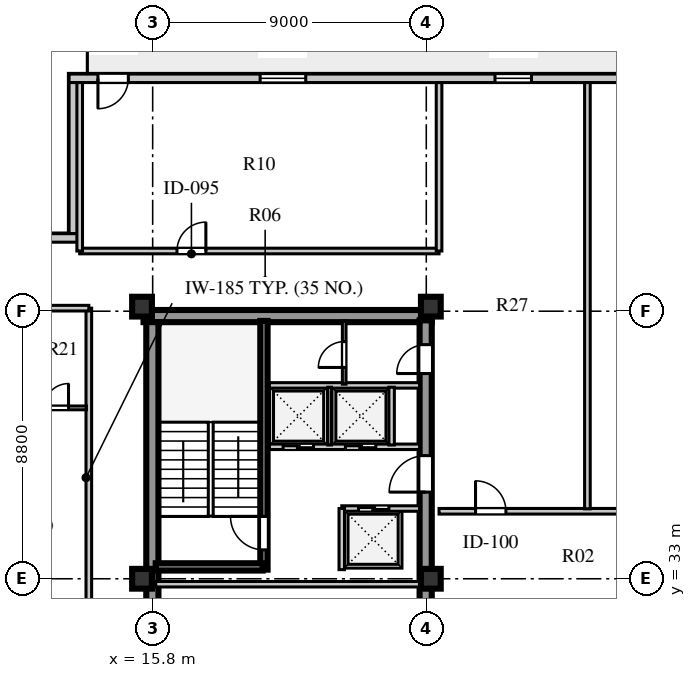
"""IFC4 building model, lengths in metres.
Left out: names, types, materials, properties, quantities, classifications, styles, units other than length and angle.
Written with IfcOpenShell. Run it as: python <this file> out.ifc"""

import sys

from ifc_helpers import new_model, si_unit, direction, frame, frame_2d, origin, origin_2d, place, context, subcontext, project, spatial, rectangle, extrude, element, fill, save


model = new_model("IFC4")
c1 = context("Model", 3, precision=1e-05, world=origin(), true_north=direction((0.0, 1.0)))
c2 = subcontext(c1, "Body", "Model", "MODEL_VIEW")
j1 = project(units=[si_unit("LENGTHUNIT", "METRE"), si_unit("PLANEANGLEUNIT", "RADIAN")], contexts=[c1])
p1 = place(None, origin())
s1 = spatial("IfcSite", under=j1, at=p1, CompositionType="ELEMENT")
p2 = place(p1, origin())
s2 = spatial("IfcBuilding", under=s1, at=p2, CompositionType="ELEMENT")
p3 = place(p2, frame((0.0, 0.0, 260.9)))
s3 = spatial("IfcBuildingStorey", under=s2, at=p3, CompositionType="ELEMENT", Elevation=260.9)
p4 = place(p3, frame((15.5, 41.64, 0.0), z_axis=(0.0, 0.0, 1.0), x_axis=(1.0, 0.0, 0.0)))
e1 = element("IfcWall", 1, at=p4, inside=s3, PredefinedType="SHEAR", context=c2, shape_type="SweptSolid", body=[
    extrude(rectangle(XDim=9.48, YDim=0.4, at=frame_2d((4.74, 0.0))), origin(), (0.0, 0.0, 1.0), 3.66),
])
p5 = place(p3, frame((15.79, 15.81, 0.0), z_axis=(0.0, 0.0, 1.0), x_axis=(0.0, 1.0, 0.0)))
e2 = element("IfcWall", 2, at=p5, inside=s3, PredefinedType="SHEAR", context=c2, shape_type="SweptSolid", body=[
    extrude(rectangle(XDim=25.63, YDim=0.4, at=frame_2d((12.815, 0.0))), origin(), (0.0, 0.0, 1.0), 3.66),
])
p6 = place(p3, frame((24.78, 15.74, 0.0), z_axis=(0.0, 0.0, 1.0), x_axis=(0.0, 1.0, 0.0)))
e3 = element("IfcWall", 3, at=p6, inside=s3, PredefinedType="SHEAR", context=c2, shape_type="SweptSolid", body=[
    extrude(rectangle(XDim=25.76, YDim=0.4, at=frame_2d((12.88, 0.0))), origin(), (0.0, 0.0, 1.0), 3.66),
])
p7 = place(p6, frame((1.61, 0.0, 0.0)))
e4 = element("IfcOpeningElement", 4, at=p7, cuts=e3, PredefinedType="OPENING", context=c2, shape_type="SweptSolid", body=[
    extrude(rectangle(XDim=1.2, YDim=2.1, at=frame_2d((0.6, 1.05))), frame((0.0, 0.21, 0.0), z_axis=(0.0, -1.0, 0.0), x_axis=(1.0, 0.0, 0.0)), (0.0, 0.0, 1.0), 0.42),
])
p8 = place(p6, frame((6.78, 0.0, 0.0)))
e5 = element("IfcOpeningElement", 5, at=p8, cuts=e3, PredefinedType="OPENING", context=c2, shape_type="SweptSolid", body=[
    extrude(rectangle(XDim=0.85, YDim=2.06, at=frame_2d((0.425, 1.03))), frame((0.0, 0.21, 0.0), z_axis=(0.0, -1.0, 0.0), x_axis=(1.0, 0.0, 0.0)), (0.0, 0.0, 1.0), 0.42),
])
p9 = place(p6, frame((12.11, 0.0, 0.0)))
e6 = element("IfcOpeningElement", 6, at=p9, cuts=e3, PredefinedType="OPENING", context=c2, shape_type="SweptSolid", body=[
    extrude(rectangle(XDim=1.5, YDim=2.12, at=frame_2d((0.75, 1.06))), frame((0.0, 0.21, 0.0), z_axis=(0.0, -1.0, 0.0), x_axis=(1.0, 0.0, 0.0)), (0.0, 0.0, 1.0), 0.42),
])
p10 = place(p6, frame((20.11, 0.0, 0.0)))
e7 = element("IfcOpeningElement", 7, at=p10, cuts=e3, PredefinedType="OPENING", context=c2, shape_type="SweptSolid", body=[
    extrude(rectangle(XDim=1.2, YDim=2.12, at=frame_2d((0.6, 1.06))), frame((0.0, 0.21, 0.0), z_axis=(0.0, -1.0, 0.0), x_axis=(1.0, 0.0, 0.0)), (0.0, 0.0, 1.0), 0.42),
])
p11 = place(p6, frame((24.01, 0.0, 0.0)))
e8 = element("IfcOpeningElement", 8, at=p11, cuts=e3, PredefinedType="OPENING", context=c2, shape_type="SweptSolid", body=[
    extrude(rectangle(XDim=0.95, YDim=2.1, at=frame_2d((0.475, 1.05))), frame((0.0, 0.21, 0.0), z_axis=(0.0, -1.0, 0.0), x_axis=(1.0, 0.0, 0.0)), (0.0, 0.0, 1.0), 0.42),
])
for number, where, z_axis, x_axis in (
    (9, (15.45, 33.0, 0.0), (0.0, 0.0, 1.0), (1.0, 0.0, 0.0)),
    (10, (15.45, 41.95, 0.0), (0.0, 0.0, 1.0), (1.0, 0.0, 0.0)),
    (11, (24.95, 33.0, 0.0), (0.0, 0.0, 1.0), (1.0, 0.0, 0.0)),
    (12, (24.95, 41.95, 0.0), (0.0, 0.0, 1.0), (1.0, 0.0, 0.0)),
):
    element("IfcColumn", number, at=place(p3, frame(where, z_axis=z_axis, x_axis=x_axis)), inside=s3, PredefinedType="COLUMN", context=c2, shape_type="SweptSolid", body=[
        extrude(rectangle(XDim=0.65, YDim=0.65, at=origin_2d()), origin(), (0.0, 0.0, 1.0), 3.66),
    ])
p12 = place(p3, frame((45.55, 49.46, 0.0), z_axis=(0.0, 0.0, 1.0), x_axis=(-1.0, 0.0, 0.0)))
e13 = element("IfcWall", 13, at=p12, inside=s3, PredefinedType="STANDARD", context=c2, shape_type="SweptSolid", body=[
    extrude(rectangle(XDim=32.5, YDim=0.28, at=frame_2d((16.25, 0.0))), origin(), (0.0, 0.0, 1.0), 3.66),
])
p13 = place(p12, frame((30.55, 0.0, 0.0)))
e14 = element("IfcOpeningElement", 14, at=p13, cuts=e13, PredefinedType="OPENING", context=c2, shape_type="SweptSolid", body=[
    extrude(rectangle(XDim=1.0, YDim=2.05, at=frame_2d((0.5, 1.025))), frame((0.0, 0.15, 0.0), z_axis=(0.0, -1.0, 0.0), x_axis=(1.0, 0.0, 0.0)), (0.0, 0.0, 1.0), 0.3),
])
p14 = place(p12, frame((24.715, 0.0, 0.8)))
e15 = element("IfcOpeningElement", 15, at=p14, cuts=e13, PredefinedType="OPENING", context=c2, shape_type="SweptSolid", body=[
    extrude(rectangle(XDim=1.5, YDim=2.0, at=frame_2d((0.75, 1.0))), frame((0.0, 0.15, 0.0), z_axis=(0.0, -1.0, 0.0), x_axis=(1.0, 0.0, 0.0)), (0.0, 0.0, 1.0), 0.3),
])
p15 = place(p12, frame((17.29, 0.0, 0.8)))
e16 = element("IfcOpeningElement", 16, at=p15, cuts=e13, PredefinedType="OPENING", context=c2, shape_type="SweptSolid", body=[
    extrude(rectangle(XDim=1.2, YDim=1.75, at=frame_2d((0.6, 0.875))), frame((0.0, 0.15, 0.0), z_axis=(0.0, -1.0, 0.0), x_axis=(1.0, 0.0, 0.0)), (0.0, 0.0, 1.0), 0.3),
])
p16 = place(p12, frame((11.94, 0.0, 0.8)))
e17 = element("IfcOpeningElement", 17, at=p16, cuts=e13, PredefinedType="OPENING", context=c2, shape_type="SweptSolid", body=[
    extrude(rectangle(XDim=2.4, YDim=2.05, at=frame_2d((1.2, 1.025))), frame((0.0, 0.15, 0.0), z_axis=(0.0, -1.0, 0.0), x_axis=(1.0, 0.0, 0.0)), (0.0, 0.0, 1.0), 0.3),
])
p17 = place(p12, frame((4.42, 0.0, 0.8)))
e18 = element("IfcOpeningElement", 18, at=p17, cuts=e13, PredefinedType="OPENING", context=c2, shape_type="SweptSolid", body=[
    extrude(rectangle(XDim=2.1, YDim=1.95, at=frame_2d((1.05, 0.975))), frame((0.0, 0.15, 0.0), z_axis=(0.0, -1.0, 0.0), x_axis=(1.0, 0.0, 0.0)), (0.0, 0.0, 1.0), 0.3),
])
p18 = place(p3, frame((13.19, 49.32, 0.0), z_axis=(0.0, 0.0, 1.0), x_axis=(0.0, -1.0, 0.0)))
e19 = element("IfcWall", 19, at=p18, inside=s3, PredefinedType="STANDARD", context=c2, shape_type="SweptSolid", body=[
    extrude(rectangle(XDim=4.97, YDim=0.28, at=frame_2d((2.485, 0.0))), origin(), (0.0, 0.0, 1.0), 3.66),
])
p19 = place(p3, frame((13.33, 44.21, 0.0), z_axis=(0.0, 0.0, 1.0), x_axis=(-1.0, 0.0, 0.0)))
e20 = element("IfcWall", 20, at=p19, inside=s3, PredefinedType="STANDARD", context=c2, shape_type="SweptSolid", body=[
    extrude(rectangle(XDim=5.53, YDim=0.28, at=frame_2d((2.765, 0.0))), origin(), (0.0, 0.0, 1.0), 3.66),
])
p20 = place(p3, frame((15.9, 32.82, 0.0), z_axis=(0.0, 0.0, 1.0), x_axis=(1.0, 0.0, 0.0)))
e21 = element("IfcWall", 21, at=p20, inside=s3, PredefinedType="SOLIDWALL", context=c2, shape_type="SweptSolid", body=[
    extrude(rectangle(XDim=8.68, YDim=0.18, at=frame_2d((4.34, 0.0))), origin(), (0.0, 0.0, 1.0), 3.06),
])
p21 = place(p3, frame((19.46, 33.3, 0.0), z_axis=(0.0, 0.0, 1.0), x_axis=(0.0, 1.0, 0.0)))
e22 = element("IfcWall", 22, at=p21, inside=s3, PredefinedType="SHEAR", context=c2, shape_type="SweptSolid", body=[
    extrude(rectangle(XDim=8.18, YDim=0.24, at=frame_2d((4.09, 0.0))), origin(), (0.0, 0.0, 1.0), 3.9),
])
p22 = place(p21, frame((0.65, 0.0, 0.0)))
e23 = element("IfcOpeningElement", 23, at=p22, cuts=e22, PredefinedType="OPENING", context=c2, shape_type="SweptSolid", body=[
    extrude(rectangle(XDim=1.1, YDim=2.1, at=frame_2d((0.55, 1.05))), frame((0.0, 0.13, 0.0), z_axis=(0.0, -1.0, 0.0), x_axis=(1.0, 0.0, 0.0)), (0.0, 0.0, 1.0), 0.26),
])
p23 = place(p3, frame((15.9, 33.39, 0.0), z_axis=(0.0, 0.0, 1.0), x_axis=(1.0, 0.0, 0.0)))
e24 = element("IfcWall", 24, at=p23, inside=s3, PredefinedType="SHEAR", context=c2, shape_type="SweptSolid", body=[
    extrude(rectangle(XDim=3.52, YDim=0.24, at=frame_2d((1.76, 0.0))), origin(), (0.0, 0.0, 1.0), 3.9),
])
p24 = place(p3, frame((22.02, 35.31, 0.0), z_axis=(0.0, 0.0, 1.0), x_axis=(1.0, 0.0, 0.0)))
e25 = element("IfcWall", 25, at=p24, inside=s3, PredefinedType="SOLIDWALL", context=c2, shape_type="SweptSolid", body=[
    extrude(rectangle(XDim=2.56, YDim=0.18, at=frame_2d((1.28, 0.0))), origin(), (0.0, 0.0, 1.0), 3.66),
])
p25 = place(p24, frame((0.55, 0.0, 0.0)))
e26 = element("IfcOpeningElement", 26, at=p25, cuts=e25, PredefinedType="OPENING", context=c2, shape_type="SweptSolid", body=[
    extrude(rectangle(XDim=1.0, YDim=2.1, at=frame_2d((0.5, 1.05))), frame((0.0, 0.1, 0.0), z_axis=(0.0, -1.0, 0.0), x_axis=(1.0, 0.0, 0.0)), (0.0, 0.0, 1.0), 0.2),
])
p26 = place(p3, frame((22.02, 33.3, 0.0), z_axis=(0.0, 0.0, 1.0), x_axis=(0.0, 1.0, 0.0)))
e27 = element("IfcWall", 27, at=p26, inside=s3, PredefinedType="SOLIDWALL", context=c2, shape_type="SweptSolid", body=[
    extrude(rectangle(XDim=2.01, YDim=0.18, at=frame_2d((1.005, 0.0))), origin(), (0.0, 0.0, 1.0), 3.66),
])
p27 = place(p3, frame((19.64, 37.34, 0.0), z_axis=(0.0, 0.0, 1.0), x_axis=(1.0, 0.0, 0.0)))
e28 = element("IfcWall", 28, at=p27, inside=s3, PredefinedType="SOLIDWALL", context=c2, shape_type="SweptSolid", body=[
    extrude(rectangle(XDim=4.94, YDim=0.18, at=frame_2d((2.47, 0.0))), origin(), (0.0, 0.0, 1.0), 3.66),
])
p28 = place(p27, frame((0.45, 0.0, 0.0)))
e29 = element("IfcOpeningElement", 29, at=p28, cuts=e28, PredefinedType="OPENING", context=c2, shape_type="SweptSolid", body=[
    extrude(rectangle(XDim=1.0, YDim=2.1, at=frame_2d((0.5, 1.05))), frame((0.0, 0.1, 0.0), z_axis=(0.0, -1.0, 0.0), x_axis=(1.0, 0.0, 0.0)), (0.0, 0.0, 1.0), 0.2),
])
p29 = place(p27, frame((2.5, 0.0, 0.0)))
e30 = element("IfcOpeningElement", 30, at=p29, cuts=e28, PredefinedType="OPENING", context=c2, shape_type="SweptSolid", body=[
    extrude(rectangle(XDim=1.0, YDim=2.1, at=frame_2d((0.5, 1.05))), frame((0.0, 0.1, 0.0), z_axis=(0.0, -1.0, 0.0), x_axis=(1.0, 0.0, 0.0)), (0.0, 0.0, 1.0), 0.2),
])
p30 = place(p3, frame((19.64, 39.36, 0.0), z_axis=(0.0, 0.0, 1.0), x_axis=(1.0, 0.0, 0.0)))
e31 = element("IfcWall", 31, at=p30, inside=s3, PredefinedType="SOLIDWALL", context=c2, shape_type="SweptSolid", body=[
    extrude(rectangle(XDim=4.94, YDim=0.18, at=frame_2d((2.47, 0.0))), origin(), (0.0, 0.0, 1.0), 3.66),
])
p31 = place(p3, frame((21.62, 37.4, 0.0), z_axis=(0.0, 0.0, 1.0), x_axis=(0.0, 1.0, 0.0)))
e32 = element("IfcWall", 32, at=p31, inside=s3, PredefinedType="PARTITIONING", context=c2, shape_type="SweptSolid", body=[
    extrude(rectangle(XDim=1.9, YDim=0.12, at=frame_2d((0.95, 0.0))), origin(), (0.0, 0.0, 1.0), 3.66),
])
p32 = place(p3, frame((23.66, 37.4, 0.0), z_axis=(0.0, 0.0, 1.0), x_axis=(0.0, 1.0, 0.0)))
e33 = element("IfcWall", 33, at=p32, inside=s3, PredefinedType="SOLIDWALL", context=c2, shape_type="SweptSolid", body=[
    extrude(rectangle(XDim=1.9, YDim=0.18, at=frame_2d((0.95, 0.0))), origin(), (0.0, 0.0, 1.0), 3.66),
])
p33 = place(p3, frame((22.1, 39.4, 0.0), z_axis=(0.0, 0.0, 1.0), x_axis=(0.0, 1.0, 0.0)))
e34 = element("IfcWall", 34, at=p33, inside=s3, PredefinedType="PARTITIONING", context=c2, shape_type="SweptSolid", body=[
    extrude(rectangle(XDim=2.08, YDim=0.12, at=frame_2d((1.04, 0.0))), origin(), (0.0, 0.0, 1.0), 3.66),
])
p34 = place(p33, frame((0.55, 0.0, 0.0)))
e35 = element("IfcOpeningElement", 35, at=p34, cuts=e34, PredefinedType="OPENING", context=c2, shape_type="SweptSolid", body=[
    extrude(rectangle(XDim=0.85, YDim=2.06, at=frame_2d((0.425, 1.03))), frame((0.0, 0.07, 0.0), z_axis=(0.0, -1.0, 0.0), x_axis=(1.0, 0.0, 0.0)), (0.0, 0.0, 1.0), 0.14),
])
p35 = place(p3, frame((25.22, 35.22, 0.0), z_axis=(0.0, 0.0, 1.0), x_axis=(1.0, 0.0, 0.0)))
e36 = element("IfcWall", 36, at=p35, inside=s3, PredefinedType="SOLIDWALL", context=c2, shape_type="SweptSolid", body=[
    extrude(rectangle(XDim=9.5, YDim=0.185, at=frame_2d((4.75, 0.0))), origin(), (0.0, 0.0, 1.0), 3.66),
])
p36 = place(p35, frame((1.2, 0.0, 0.0)))
e37 = element("IfcOpeningElement", 37, at=p36, cuts=e36, PredefinedType="OPENING", context=c2, shape_type="SweptSolid", body=[
    extrude(rectangle(XDim=1.0, YDim=2.08, at=frame_2d((0.5, 1.04))), frame((0.0, 0.103, 0.0), z_axis=(0.0, -1.0, 0.0), x_axis=(1.0, 0.0, 0.0)), (0.0, 0.0, 1.0), 0.205),
])
p37 = place(p35, frame((6.2, 0.0, 0.0)))
e38 = element("IfcOpeningElement", 38, at=p37, cuts=e36, PredefinedType="OPENING", context=c2, shape_type="SweptSolid", body=[
    extrude(rectangle(XDim=0.9, YDim=2.08, at=frame_2d((0.45, 1.04))), frame((0.0, 0.103, 0.0), z_axis=(0.0, -1.0, 0.0), x_axis=(1.0, 0.0, 0.0)), (0.0, 0.0, 1.0), 0.205),
])
p38 = place(p3, frame((13.4, 43.78, 0.0), z_axis=(0.0, 0.0, 1.0), x_axis=(1.0, 0.0, 0.0)))
e39 = element("IfcWall", 39, at=p38, inside=s3, PredefinedType="SOLIDWALL", context=c2, shape_type="SweptSolid", body=[
    extrude(rectangle(XDim=11.82, YDim=0.185, at=frame_2d((5.91, 0.0))), origin(), (0.0, 0.0, 1.0), 3.66),
])
p39 = place(p38, frame((3.2, 0.0, 0.0)))
e40 = element("IfcOpeningElement", 40, at=p39, cuts=e39, PredefinedType="OPENING", context=c2, shape_type="SweptSolid", body=[
    extrude(rectangle(XDim=0.95, YDim=2.08, at=frame_2d((0.475, 1.04))), frame((0.0, 0.103, 0.0), z_axis=(0.0, -1.0, 0.0), x_axis=(1.0, 0.0, 0.0)), (0.0, 0.0, 1.0), 0.205),
])
p40 = place(p3, frame((13.4, 43.78, 0.0), z_axis=(0.0, 0.0, 1.0), x_axis=(0.0, 1.0, 0.0)))
e41 = element("IfcWall", 41, at=p40, inside=s3, PredefinedType="SOLIDWALL", context=c2, shape_type="SweptSolid", body=[
    extrude(rectangle(XDim=5.54, YDim=0.185, at=frame_2d((2.77, 0.0))), origin(), (0.0, 0.0, 1.0), 3.66),
])
p41 = place(p3, frame((25.22, 43.78, 0.0), z_axis=(0.0, 0.0, 1.0), x_axis=(0.0, 1.0, 0.0)))
e42 = element("IfcWall", 42, at=p41, inside=s3, PredefinedType="SOLIDWALL", context=c2, shape_type="SweptSolid", body=[
    extrude(rectangle(XDim=5.54, YDim=0.185, at=frame_2d((2.77, 0.0))), origin(), (0.0, 0.0, 1.0), 3.21),
])
p42 = place(p3, frame((13.7, 15.3, 0.0), z_axis=(0.0, 0.0, 1.0), x_axis=(0.0, 1.0, 0.0)))
e43 = element("IfcWall", 43, at=p42, inside=s3, PredefinedType="SOLIDWALL", context=c2, shape_type="SweptSolid", body=[
    extrude(rectangle(XDim=26.6, YDim=0.185, at=frame_2d((13.3, 0.0))), origin(), (0.0, 0.0, 1.0), 3.66),
])
p43 = place(p42, frame((0.65, 0.0, 0.0)))
e44 = element("IfcOpeningElement", 44, at=p43, cuts=e43, PredefinedType="OPENING", context=c2, shape_type="SweptSolid", body=[
    extrude(rectangle(XDim=0.95, YDim=2.1, at=frame_2d((0.475, 1.05))), frame((0.0, 0.103, 0.0), z_axis=(0.0, -1.0, 0.0), x_axis=(1.0, 0.0, 0.0)), (0.0, 0.0, 1.0), 0.205),
])
p44 = place(p42, frame((7.1, 0.0, 0.0)))
e45 = element("IfcOpeningElement", 45, at=p44, cuts=e43, PredefinedType="OPENING", context=c2, shape_type="SweptSolid", body=[
    extrude(rectangle(XDim=0.95, YDim=2.1, at=frame_2d((0.475, 1.05))), frame((0.0, 0.103, 0.0), z_axis=(0.0, -1.0, 0.0), x_axis=(1.0, 0.0, 0.0)), (0.0, 0.0, 1.0), 0.205),
])
p45 = place(p42, frame((14.35, 0.0, 0.0)))
e46 = element("IfcOpeningElement", 46, at=p45, cuts=e43, PredefinedType="OPENING", context=c2, shape_type="SweptSolid", body=[
    extrude(rectangle(XDim=0.95, YDim=2.1, at=frame_2d((0.475, 1.05))), frame((0.0, 0.103, 0.0), z_axis=(0.0, -1.0, 0.0), x_axis=(1.0, 0.0, 0.0)), (0.0, 0.0, 1.0), 0.205),
])
p46 = place(p3, frame((8.08, 41.9, 0.0), z_axis=(0.0, 0.0, 1.0), x_axis=(1.0, 0.0, 0.0)))
e47 = element("IfcWall", 47, at=p46, inside=s3, PredefinedType="SOLIDWALL", context=c2, shape_type="SweptSolid", body=[
    extrude(rectangle(XDim=5.62, YDim=0.185, at=frame_2d((2.81, 0.0))), origin(), (0.0, 0.0, 1.0), 3.21),
])
p47 = place(p3, frame((10.45, 38.62, 0.0), z_axis=(0.0, 0.0, 1.0), x_axis=(1.0, 0.0, 0.0)))
e48 = element("IfcWall", 48, at=p47, inside=s3, PredefinedType="PLUMBINGWALL", context=c2, shape_type="SweptSolid", body=[
    extrude(rectangle(XDim=3.17, YDim=0.125, at=frame_2d((1.585, 0.0))), origin(), (0.0, 0.0, 1.0), 3.66),
])
p48 = place(p47, frame((0.16, 0.0, 0.0)))
e49 = element("IfcOpeningElement", 49, at=p48, cuts=e48, PredefinedType="OPENING", context=c2, shape_type="SweptSolid", body=[
    extrude(rectangle(XDim=0.8, YDim=2.05, at=frame_2d((0.4, 1.025))), frame((0.0, 0.073, 0.0), z_axis=(0.0, -1.0, 0.0), x_axis=(1.0, 0.0, 0.0)), (0.0, 0.0, 1.0), 0.145),
])
p49 = place(p47, frame((1.782, 0.0, 0.0)))
e50 = element("IfcOpeningElement", 50, at=p49, cuts=e48, PredefinedType="OPENING", context=c2, shape_type="SweptSolid", body=[
    extrude(rectangle(XDim=0.8, YDim=2.05, at=frame_2d((0.4, 1.025))), frame((0.0, 0.073, 0.0), z_axis=(0.0, -1.0, 0.0), x_axis=(1.0, 0.0, 0.0)), (0.0, 0.0, 1.0), 0.145),
])
p50 = place(p3, frame((30.1, 35.3, 0.0), z_axis=(0.0, 0.0, 1.0), x_axis=(0.0, 1.0, 0.0)))
e51 = element("IfcWall", 51, at=p50, inside=s3, PredefinedType="SOLIDWALL", context=c2, shape_type="SweptSolid", body=[
    extrude(rectangle(XDim=14.02, YDim=0.185, at=frame_2d((7.01, 0.0))), origin(), (0.0, 0.0, 1.0), 3.66),
])
p51 = place(p13, frame((1.0, 0.0, 0.0), z_axis=(0.0, 0.0, 1.0), x_axis=(-1.0, 0.0, 0.0)))
e52 = element("IfcDoor", 52, at=p51, inside=s3, OperationType="SINGLE_SWING_LEFT", PredefinedType="DOOR", context=c2, shape_type="SweptSolid", body=[
    extrude(rectangle(XDim=1.0, YDim=2.05, at=frame_2d((0.5, 1.025))), frame((0.0, 0.025, 0.0), z_axis=(0.0, -1.0, 0.0), x_axis=(1.0, 0.0, 0.0)), (0.0, 0.0, 1.0), 0.05),
])
fill(e14, e52)
p52 = place(p14, origin())
e53 = element("IfcWindow", 53, at=p52, inside=s3, PartitioningType="SINGLE_PANEL", PredefinedType="WINDOW", context=c2, shape_type="SweptSolid", body=[
    extrude(rectangle(XDim=1.5, YDim=2.0, at=frame_2d((0.75, 1.0))), frame((0.0, 0.03, 0.0), z_axis=(0.0, -1.0, 0.0), x_axis=(1.0, 0.0, 0.0)), (0.0, 0.0, 1.0), 0.06),
])
fill(e15, e53)
p53 = place(p15, origin())
e54 = element("IfcWindow", 54, at=p53, inside=s3, PartitioningType="SINGLE_PANEL", PredefinedType="WINDOW", context=c2, shape_type="SweptSolid", body=[
    extrude(rectangle(XDim=1.2, YDim=1.75, at=frame_2d((0.6, 0.875))), frame((0.0, 0.03, 0.0), z_axis=(0.0, -1.0, 0.0), x_axis=(1.0, 0.0, 0.0)), (0.0, 0.0, 1.0), 0.06),
])
fill(e16, e54)
p54 = place(p22, origin())
e55 = element("IfcDoor", 55, at=p54, inside=s3, OperationType="SINGLE_SWING_RIGHT", PredefinedType="DOOR", context=c2, shape_type="SweptSolid", body=[
    extrude(rectangle(XDim=1.1, YDim=2.1, at=frame_2d((0.55, 1.05))), frame((0.0, 0.025, 0.0), z_axis=(0.0, -1.0, 0.0), x_axis=(1.0, 0.0, 0.0)), (0.0, 0.0, 1.0), 0.05),
])
fill(e23, e55)
p55 = place(p10, frame((1.2, 0.0, 0.0), z_axis=(0.0, 0.0, 1.0), x_axis=(-1.0, 0.0, 0.0)))
e56 = element("IfcDoor", 56, at=p55, inside=s3, OperationType="SINGLE_SWING_RIGHT", PredefinedType="DOOR", context=c2, shape_type="SweptSolid", body=[
    extrude(rectangle(XDim=1.2, YDim=2.12, at=frame_2d((0.6, 1.06))), frame((0.0, 0.025, 0.0), z_axis=(0.0, -1.0, 0.0), x_axis=(1.0, 0.0, 0.0)), (0.0, 0.0, 1.0), 0.05),
])
fill(e7, e56)
p56 = place(p28, frame((1.0, 0.0, 0.0), z_axis=(0.0, 0.0, 1.0), x_axis=(-1.0, 0.0, 0.0)))
e57 = element("IfcDoor", 57, at=p56, inside=s3, OperationType="DOUBLE_DOOR_SLIDING", PredefinedType="DOOR", context=c2, shape_type="SweptSolid", body=[
    extrude(rectangle(XDim=1.0, YDim=2.1, at=frame_2d((0.5, 1.05))), frame((0.0, 0.025, 0.0), z_axis=(0.0, -1.0, 0.0), x_axis=(1.0, 0.0, 0.0)), (0.0, 0.0, 1.0), 0.05),
])
fill(e29, e57)
p57 = place(p29, frame((1.0, 0.0, 0.0), z_axis=(0.0, 0.0, 1.0), x_axis=(-1.0, 0.0, 0.0)))
e58 = element("IfcDoor", 58, at=p57, inside=s3, OperationType="DOUBLE_DOOR_SLIDING", PredefinedType="DOOR", context=c2, shape_type="SweptSolid", body=[
    extrude(rectangle(XDim=1.0, YDim=2.1, at=frame_2d((0.5, 1.05))), frame((0.0, 0.025, 0.0), z_axis=(0.0, -1.0, 0.0), x_axis=(1.0, 0.0, 0.0)), (0.0, 0.0, 1.0), 0.05),
])
fill(e30, e58)
p58 = place(p25, origin())
e59 = element("IfcDoor", 59, at=p58, inside=s3, OperationType="DOUBLE_DOOR_SLIDING", PredefinedType="DOOR", context=c2, shape_type="SweptSolid", body=[
    extrude(rectangle(XDim=1.0, YDim=2.1, at=frame_2d((0.5, 1.05))), frame((0.0, 0.025, 0.0), z_axis=(0.0, -1.0, 0.0), x_axis=(1.0, 0.0, 0.0)), (0.0, 0.0, 1.0), 0.05),
])
fill(e26, e59)
p59 = place(p34, origin())
e60 = element("IfcDoor", 60, at=p59, inside=s3, OperationType="SINGLE_SWING_LEFT", PredefinedType="DOOR", context=c2, shape_type="SweptSolid", body=[
    extrude(rectangle(XDim=0.85, YDim=2.06, at=frame_2d((0.425, 1.03))), frame((0.0, 0.025, 0.0), z_axis=(0.0, -1.0, 0.0), x_axis=(1.0, 0.0, 0.0)), (0.0, 0.0, 1.0), 0.05),
])
fill(e35, e60)
p60 = place(p11, frame((0.95, 0.0, 0.0), z_axis=(0.0, 0.0, 1.0), x_axis=(-1.0, 0.0, 0.0)))
e61 = element("IfcDoor", 61, at=p60, inside=s3, OperationType="SINGLE_SWING_RIGHT", PredefinedType="DOOR", context=c2, shape_type="SweptSolid", body=[
    extrude(rectangle(XDim=0.95, YDim=2.1, at=frame_2d((0.475, 1.05))), frame((0.0, 0.025, 0.0), z_axis=(0.0, -1.0, 0.0), x_axis=(1.0, 0.0, 0.0)), (0.0, 0.0, 1.0), 0.05),
])
fill(e8, e61)
p61 = place(p39, origin())
e62 = element("IfcDoor", 62, at=p61, inside=s3, OperationType="SINGLE_SWING_RIGHT", PredefinedType="DOOR", context=c2, shape_type="SweptSolid", body=[
    extrude(rectangle(XDim=0.95, YDim=2.08, at=frame_2d((0.475, 1.04))), frame((0.0, 0.025, 0.0), z_axis=(0.0, -1.0, 0.0), x_axis=(1.0, 0.0, 0.0)), (0.0, 0.0, 1.0), 0.05),
])
fill(e40, e62)
p62 = place(p49, origin())
e63 = element("IfcDoor", 63, at=p62, inside=s3, OperationType="SINGLE_SWING_RIGHT", PredefinedType="DOOR", context=c2, shape_type="SweptSolid", body=[
    extrude(rectangle(XDim=0.8, YDim=2.05, at=frame_2d((0.4, 1.025))), frame((0.0, 0.025, 0.0), z_axis=(0.0, -1.0, 0.0), x_axis=(1.0, 0.0, 0.0)), (0.0, 0.0, 1.0), 0.05),
])
fill(e50, e63)
p63 = place(p36, origin())
e64 = element("IfcDoor", 64, at=p63, inside=s3, OperationType="SINGLE_SWING_LEFT", PredefinedType="DOOR", context=c2, shape_type="SweptSolid", body=[
    extrude(rectangle(XDim=1.0, YDim=2.08, at=frame_2d((0.5, 1.04))), frame((0.0, 0.025, 0.0), z_axis=(0.0, -1.0, 0.0), x_axis=(1.0, 0.0, 0.0)), (0.0, 0.0, 1.0), 0.05),
])
fill(e37, e64)
save(model, sys.argv[1])
